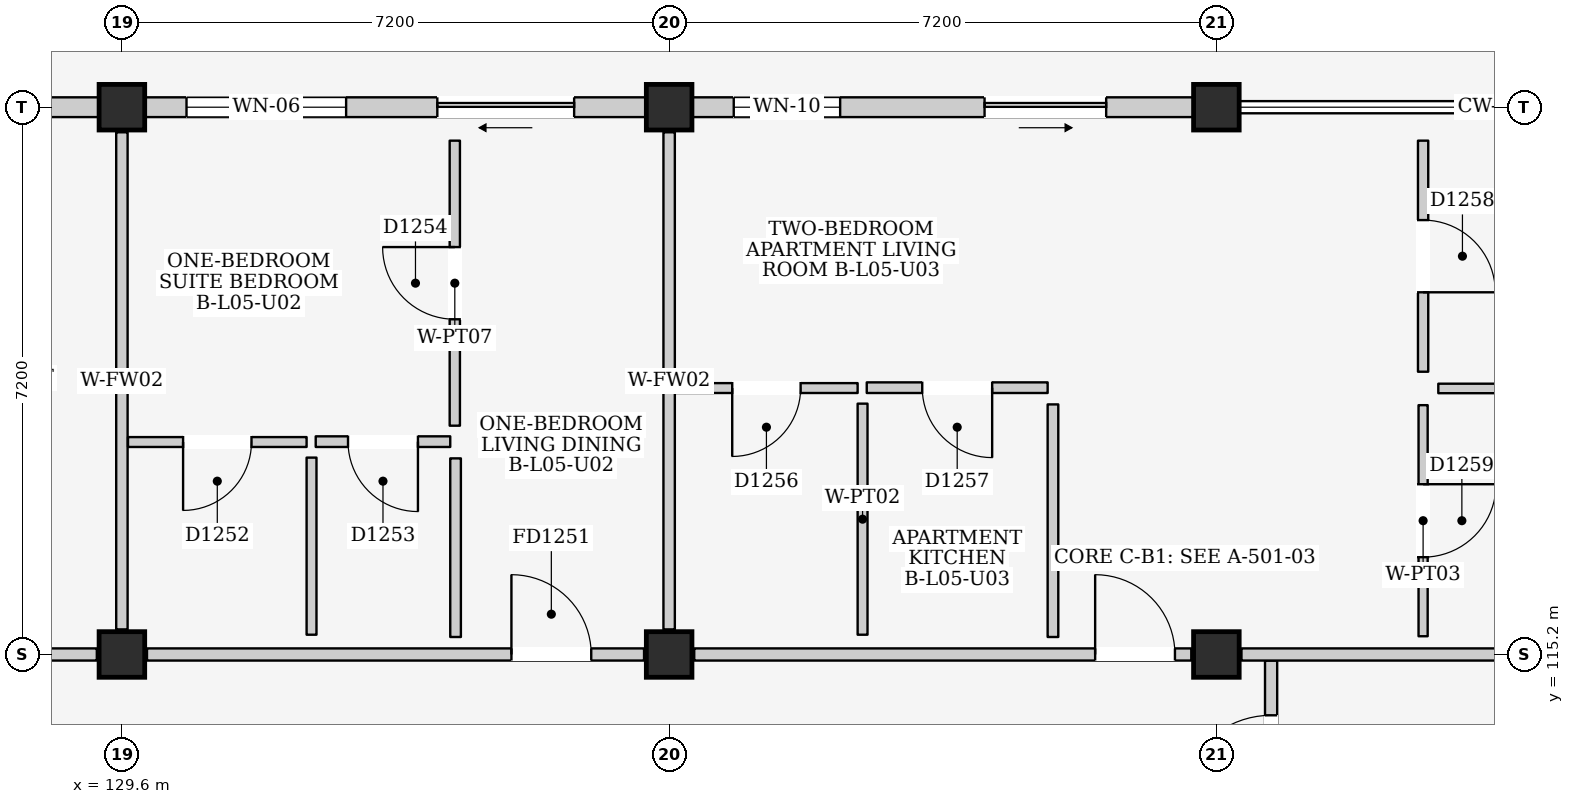
"""IFC4 building model, lengths in metres.
Left out: names, types, materials, properties, quantities, classifications, styles, units other than length and angle.
Written with IfcOpenShell. Run it as: python <this file> out.ifc"""

import sys

from ifc_helpers import new_model, si_unit, direction, frame, frame_2d, origin, origin_2d, place, context, subcontext, project, spatial, rectangle, extrude, element, fill, save


model = new_model("IFC4")
c1 = context("Model", 3, precision=1e-05, world=origin(), true_north=direction((0.0, 1.0)))
c2 = subcontext(c1, "Body", "Model", "MODEL_VIEW")
j1 = project(units=[si_unit("LENGTHUNIT", "METRE"), si_unit("PLANEANGLEUNIT", "RADIAN")], contexts=[c1])
p1 = place(None, origin())
s1 = spatial("IfcSite", under=j1, at=p1, CompositionType="ELEMENT")
p2 = place(p1, origin())
s2 = spatial("IfcBuilding", under=s1, at=p2, CompositionType="ELEMENT")
p3 = place(p2, frame((0.0, 0.0, 18.6)))
s3 = spatial("IfcBuildingStorey", under=s2, at=p3, CompositionType="ELEMENT", Elevation=18.6)
for number, where, z_axis, x_axis in (
    (1, (129.6, 115.2, 0.0), (0.0, 0.0, 1.0), (1.0, 0.0, 0.0)),
    (2, (129.6, 122.4, 0.0), (0.0, 0.0, 1.0), (1.0, 0.0, 0.0)),
    (3, (136.8, 115.2, 0.0), (0.0, 0.0, 1.0), (1.0, 0.0, 0.0)),
    (4, (136.8, 122.4, 0.0), (0.0, 0.0, 1.0), (1.0, 0.0, 0.0)),
    (5, (144.0, 115.2, 0.0), (0.0, 0.0, 1.0), (1.0, 0.0, 0.0)),
    (6, (144.0, 122.4, 0.0), (0.0, 0.0, 1.0), (1.0, 0.0, 0.0)),
):
    element("IfcColumn", number, at=place(p3, frame(where, z_axis=z_axis, x_axis=x_axis)), inside=s3, PredefinedType="COLUMN", context=c2, shape_type="SweptSolid", body=[
        extrude(rectangle(XDim=0.6, YDim=0.6, at=origin_2d()), origin(), (0.0, 0.0, 1.0), 3.3),
    ])
p4 = place(p3, frame((122.7, 122.4, 0.0), z_axis=(0.0, 0.0, 1.0), x_axis=(1.0, 0.0, 0.0)))
e7 = element("IfcWall", 7, at=p4, inside=s3, PredefinedType="ELEMENTEDWALL", context=c2, shape_type="SweptSolid", body=[
    extrude(rectangle(XDim=6.6, YDim=0.26, at=frame_2d((3.3, 0.0))), origin(), (0.0, 0.0, 1.0), 2.595),
])
p5 = place(p4, frame((3.85, 0.0, 0.0)))
e8 = element("IfcOpeningElement", 8, at=p5, cuts=e7, PredefinedType="OPENING", context=c2, shape_type="SweptSolid", body=[
    extrude(rectangle(XDim=1.4, YDim=2.1, at=frame_2d((0.7, 1.05))), frame((0.0, 0.145, 0.0), z_axis=(0.0, -1.0, 0.0), x_axis=(1.0, 0.0, 0.0)), (0.0, 0.0, 1.0), 0.29),
])
p6 = place(p4, frame((0.55, 0.0, 0.835)))
e9 = element("IfcOpeningElement", 9, at=p6, cuts=e7, PredefinedType="OPENING", context=c2, shape_type="SweptSolid", body=[
    extrude(rectangle(XDim=2.4, YDim=1.65, at=frame_2d((1.2, 0.825))), frame((0.0, 0.145, 0.0), z_axis=(0.0, -1.0, 0.0), x_axis=(1.0, 0.0, 0.0)), (0.0, 0.0, 1.0), 0.29),
])
p7 = place(p3, frame((129.9, 122.4, 0.0), z_axis=(0.0, 0.0, 1.0), x_axis=(1.0, 0.0, 0.0)))
e10 = element("IfcWall", 10, at=p7, inside=s3, PredefinedType="ELEMENTEDWALL", context=c2, shape_type="SweptSolid", body=[
    extrude(rectangle(XDim=6.6, YDim=0.26, at=frame_2d((3.3, 0.0))), origin(), (0.0, 0.0, 1.0), 2.595),
])
p8 = place(p7, frame((3.85, 0.0, 0.0)))
e11 = element("IfcOpeningElement", 11, at=p8, cuts=e10, PredefinedType="OPENING", context=c2, shape_type="SweptSolid", body=[
    extrude(rectangle(XDim=1.8, YDim=2.12, at=frame_2d((0.9, 1.06))), frame((0.0, 0.145, 0.0), z_axis=(0.0, -1.0, 0.0), x_axis=(1.0, 0.0, 0.0)), (0.0, 0.0, 1.0), 0.29),
])
p9 = place(p7, frame((0.55, 0.0, 0.835)))
e12 = element("IfcOpeningElement", 12, at=p9, cuts=e10, PredefinedType="OPENING", context=c2, shape_type="SweptSolid", body=[
    extrude(rectangle(XDim=2.1, YDim=1.65, at=frame_2d((1.05, 0.825))), frame((0.0, 0.145, 0.0), z_axis=(0.0, -1.0, 0.0), x_axis=(1.0, 0.0, 0.0)), (0.0, 0.0, 1.0), 0.29),
])
p10 = place(p3, frame((137.1, 122.4, 0.0), z_axis=(0.0, 0.0, 1.0), x_axis=(1.0, 0.0, 0.0)))
e13 = element("IfcWall", 13, at=p10, inside=s3, PredefinedType="ELEMENTEDWALL", context=c2, shape_type="SweptSolid", body=[
    extrude(rectangle(XDim=6.6, YDim=0.26, at=frame_2d((3.3, 0.0))), origin(), (0.0, 0.0, 1.0), 2.595),
])
p11 = place(p10, frame((3.85, 0.0, 0.0)))
e14 = element("IfcOpeningElement", 14, at=p11, cuts=e13, PredefinedType="OPENING", context=c2, shape_type="SweptSolid", body=[
    extrude(rectangle(XDim=1.6, YDim=2.12, at=frame_2d((0.8, 1.06))), frame((0.0, 0.145, 0.0), z_axis=(0.0, -1.0, 0.0), x_axis=(1.0, 0.0, 0.0)), (0.0, 0.0, 1.0), 0.29),
])
p12 = place(p10, frame((0.55, 0.0, 0.9)))
e15 = element("IfcOpeningElement", 15, at=p12, cuts=e13, PredefinedType="OPENING", context=c2, shape_type="SweptSolid", body=[
    extrude(rectangle(XDim=1.4, YDim=1.2, at=frame_2d((0.7, 0.6))), frame((0.0, 0.145, 0.0), z_axis=(0.0, -1.0, 0.0), x_axis=(1.0, 0.0, 0.0)), (0.0, 0.0, 1.0), 0.29),
])
p13 = place(p3, frame((144.72, 111.1, 0.0), z_axis=(0.0, 0.0, 1.0), x_axis=(0.0, 1.0, 0.0)))
e16 = element("IfcWall", 16, at=p13, inside=s3, PredefinedType="PARTITIONING", context=c2, shape_type="SweptSolid", body=[
    extrude(rectangle(XDim=4.02, YDim=0.16, at=frame_2d((2.01, 0.0))), origin(), (0.0, 0.0, 1.0), 3.06),
])
p14 = place(p13, frame((2.1, 0.0, 0.0)))
e17 = element("IfcOpeningElement", 17, at=p14, cuts=e16, PredefinedType="OPENING", context=c2, shape_type="SweptSolid", body=[
    extrude(rectangle(XDim=1.2, YDim=2.2, at=frame_2d((0.6, 1.1))), frame((0.0, 0.095, 0.0), z_axis=(0.0, -1.0, 0.0), x_axis=(1.0, 0.0, 0.0)), (0.0, 0.0, 1.0), 0.19),
])
p15 = place(p3, frame((122.73, 115.2, 0.0), z_axis=(0.0, 0.0, 1.0), x_axis=(1.0, 0.0, 0.0)))
e18 = element("IfcWall", 18, at=p15, inside=s3, PredefinedType="PARTITIONING", context=c2, shape_type="SweptSolid", body=[
    extrude(rectangle(XDim=6.54, YDim=0.16, at=frame_2d((3.27, 0.0))), origin(), (0.0, 0.0, 1.0), 2.445),
])
p16 = place(p15, frame((4.095, 0.0, 0.0)))
e19 = element("IfcOpeningElement", 19, at=p16, cuts=e18, PredefinedType="OPENING", context=c2, shape_type="SweptSolid", body=[
    extrude(rectangle(XDim=1.05, YDim=2.15, at=frame_2d((0.525, 1.075))), frame((0.0, 0.095, 0.0), z_axis=(0.0, -1.0, 0.0), x_axis=(1.0, 0.0, 0.0)), (0.0, 0.0, 1.0), 0.19),
])
p17 = place(p3, frame((129.6, 115.53, 0.0), z_axis=(0.0, 0.0, 1.0), x_axis=(0.0, 1.0, 0.0)))
e20 = element("IfcWall", 20, at=p17, inside=s3, PredefinedType="PARTITIONING", context=c2, shape_type="SweptSolid", body=[
    extrude(rectangle(XDim=6.54, YDim=0.15, at=frame_2d((3.27, 0.0))), origin(), (0.0, 0.0, 1.0), 2.545),
])
p18 = place(p3, frame((129.93, 115.2, 0.0), z_axis=(0.0, 0.0, 1.0), x_axis=(1.0, 0.0, 0.0)))
e21 = element("IfcWall", 21, at=p18, inside=s3, PredefinedType="PARTITIONING", context=c2, shape_type="SweptSolid", body=[
    extrude(rectangle(XDim=6.54, YDim=0.16, at=frame_2d((3.27, 0.0))), origin(), (0.0, 0.0, 1.0), 2.445),
])
p19 = place(p18, frame((4.795, 0.0, 0.0)))
e22 = element("IfcOpeningElement", 22, at=p19, cuts=e21, PredefinedType="OPENING", context=c2, shape_type="SweptSolid", body=[
    extrude(rectangle(XDim=1.05, YDim=2.15, at=frame_2d((0.525, 1.075))), frame((0.0, 0.095, 0.0), z_axis=(0.0, -1.0, 0.0), x_axis=(1.0, 0.0, 0.0)), (0.0, 0.0, 1.0), 0.19),
])
p20 = place(p3, frame((136.8, 115.53, 0.0), z_axis=(0.0, 0.0, 1.0), x_axis=(0.0, 1.0, 0.0)))
e23 = element("IfcWall", 23, at=p20, inside=s3, PredefinedType="PARTITIONING", context=c2, shape_type="SweptSolid", body=[
    extrude(rectangle(XDim=6.54, YDim=0.15, at=frame_2d((3.27, 0.0))), origin(), (0.0, 0.0, 1.0), 2.545),
])
p21 = place(p3, frame((129.68, 117.995, 0.0), z_axis=(0.0, 0.0, 1.0), x_axis=(1.0, 0.0, 0.0)))
e24 = element("IfcWall", 24, at=p21, inside=s3, PredefinedType="PARTITIONING", context=c2, shape_type="SweptSolid", body=[
    extrude(rectangle(XDim=2.35, YDim=0.13, at=frame_2d((1.175, 0.0))), origin(), (0.0, 0.0, 1.0), 3.06),
])
p22 = place(p21, frame((0.725, 0.0, 0.0)))
e25 = element("IfcOpeningElement", 25, at=p22, cuts=e24, PredefinedType="OPENING", context=c2, shape_type="SweptSolid", body=[
    extrude(rectangle(XDim=0.9, YDim=2.1, at=frame_2d((0.45, 1.05))), frame((0.0, 0.08, 0.0), z_axis=(0.0, -1.0, 0.0), x_axis=(1.0, 0.0, 0.0)), (0.0, 0.0, 1.0), 0.16),
])
p23 = place(p3, frame((132.095, 115.46, 0.0), z_axis=(0.0, 0.0, 1.0), x_axis=(0.0, 1.0, 0.0)))
e26 = element("IfcWall", 26, at=p23, inside=s3, PredefinedType="PARTITIONING", context=c2, shape_type="SweptSolid", body=[
    extrude(rectangle(XDim=2.33, YDim=0.13, at=frame_2d((1.165, 0.0))), origin(), (0.0, 0.0, 1.0), 3.06),
])
p24 = place(p3, frame((132.15, 118.0, 0.0), z_axis=(0.0, 0.0, 1.0), x_axis=(1.0, 0.0, 0.0)))
e27 = element("IfcWall", 27, at=p24, inside=s3, PredefinedType="PARTITIONING", context=c2, shape_type="SweptSolid", body=[
    extrude(rectangle(XDim=1.77, YDim=0.14, at=frame_2d((0.885, 0.0))), origin(), (0.0, 0.0, 1.0), 3.06),
])
p25 = place(p24, frame((0.425, 0.0, 0.0)))
e28 = element("IfcOpeningElement", 28, at=p25, cuts=e27, PredefinedType="OPENING", context=c2, shape_type="SweptSolid", body=[
    extrude(rectangle(XDim=0.92, YDim=2.1, at=frame_2d((0.46, 1.05))), frame((0.0, 0.085, 0.0), z_axis=(0.0, -1.0, 0.0), x_axis=(1.0, 0.0, 0.0)), (0.0, 0.0, 1.0), 0.17),
])
p26 = place(p3, frame((133.99, 115.43, 0.0), z_axis=(0.0, 0.0, 1.0), x_axis=(0.0, 1.0, 0.0)))
e29 = element("IfcWall", 29, at=p26, inside=s3, PredefinedType="PARTITIONING", context=c2, shape_type="SweptSolid", body=[
    extrude(rectangle(XDim=2.35, YDim=0.14, at=frame_2d((1.175, 0.0))), origin(), (0.0, 0.0, 1.0), 3.06),
])
p27 = place(p3, frame((133.98, 118.21, 0.0), z_axis=(0.0, 0.0, 1.0), x_axis=(0.0, 1.0, 0.0)))
e30 = element("IfcWall", 30, at=p27, inside=s3, PredefinedType="PARTITIONING", context=c2, shape_type="SweptSolid", body=[
    extrude(rectangle(XDim=3.75, YDim=0.135, at=frame_2d((1.875, 0.0))), origin(), (0.0, 0.0, 1.0), 3.06),
])
p28 = place(p27, frame((1.4, 0.0, 0.0)))
e31 = element("IfcOpeningElement", 31, at=p28, cuts=e30, PredefinedType="OPENING", context=c2, shape_type="SweptSolid", body=[
    extrude(rectangle(XDim=0.95, YDim=2.15, at=frame_2d((0.475, 1.075))), frame((0.0, 0.083, 0.0), z_axis=(0.0, -1.0, 0.0), x_axis=(1.0, 0.0, 0.0)), (0.0, 0.0, 1.0), 0.165),
])
p29 = place(p3, frame((137.13, 115.2, 0.0), z_axis=(0.0, 0.0, 1.0), x_axis=(1.0, 0.0, 0.0)))
e32 = element("IfcWall", 32, at=p29, inside=s3, PredefinedType="PARTITIONING", context=c2, shape_type="SweptSolid", body=[
    extrude(rectangle(XDim=6.54, YDim=0.16, at=frame_2d((3.27, 0.0))), origin(), (0.0, 0.0, 1.0), 2.445),
])
p30 = place(p29, frame((5.275, 0.0, 0.0)))
e33 = element("IfcOpeningElement", 33, at=p30, cuts=e32, PredefinedType="OPENING", context=c2, shape_type="SweptSolid", body=[
    extrude(rectangle(XDim=1.05, YDim=2.15, at=frame_2d((0.525, 1.075))), frame((0.0, 0.095, 0.0), z_axis=(0.0, -1.0, 0.0), x_axis=(1.0, 0.0, 0.0)), (0.0, 0.0, 1.0), 0.19),
])
p31 = place(p3, frame((144.33, 115.2, 0.0), z_axis=(0.0, 0.0, 1.0), x_axis=(1.0, 0.0, 0.0)))
e34 = element("IfcWall", 34, at=p31, inside=s3, PredefinedType="PARTITIONING", context=c2, shape_type="SweptSolid", body=[
    extrude(rectangle(XDim=6.54, YDim=0.16, at=frame_2d((3.27, 0.0))), origin(), (0.0, 0.0, 1.0), 2.445),
])
p32 = place(p3, frame((136.88, 118.705, 0.0), z_axis=(0.0, 0.0, 1.0), x_axis=(1.0, 0.0, 0.0)))
e35 = element("IfcWall", 35, at=p32, inside=s3, PredefinedType="PARTITIONING", context=c2, shape_type="SweptSolid", body=[
    extrude(rectangle(XDim=2.4, YDim=0.13, at=frame_2d((1.2, 0.0))), origin(), (0.0, 0.0, 1.0), 3.06),
])
p33 = place(p32, frame((0.75, 0.0, 0.0)))
e36 = element("IfcOpeningElement", 36, at=p33, cuts=e35, PredefinedType="OPENING", context=c2, shape_type="SweptSolid", body=[
    extrude(rectangle(XDim=0.9, YDim=2.1, at=frame_2d((0.45, 1.05))), frame((0.0, 0.08, 0.0), z_axis=(0.0, -1.0, 0.0), x_axis=(1.0, 0.0, 0.0)), (0.0, 0.0, 1.0), 0.16),
])
p34 = place(p3, frame((139.345, 115.46, 0.0), z_axis=(0.0, 0.0, 1.0), x_axis=(0.0, 1.0, 0.0)))
e37 = element("IfcWall", 37, at=p34, inside=s3, PredefinedType="PARTITIONING", context=c2, shape_type="SweptSolid", body=[
    extrude(rectangle(XDim=3.04, YDim=0.13, at=frame_2d((1.52, 0.0))), origin(), (0.0, 0.0, 1.0), 3.06),
])
p35 = place(p3, frame((139.4, 118.71, 0.0), z_axis=(0.0, 0.0, 1.0), x_axis=(1.0, 0.0, 0.0)))
e38 = element("IfcWall", 38, at=p35, inside=s3, PredefinedType="PARTITIONING", context=c2, shape_type="SweptSolid", body=[
    extrude(rectangle(XDim=2.38, YDim=0.14, at=frame_2d((1.19, 0.0))), origin(), (0.0, 0.0, 1.0), 3.06),
])
p36 = place(p35, frame((0.73, 0.0, 0.0)))
e39 = element("IfcOpeningElement", 39, at=p36, cuts=e38, PredefinedType="OPENING", context=c2, shape_type="SweptSolid", body=[
    extrude(rectangle(XDim=0.92, YDim=2.1, at=frame_2d((0.46, 1.05))), frame((0.0, 0.085, 0.0), z_axis=(0.0, -1.0, 0.0), x_axis=(1.0, 0.0, 0.0)), (0.0, 0.0, 1.0), 0.17),
])
p37 = place(p3, frame((141.85, 115.43, 0.0), z_axis=(0.0, 0.0, 1.0), x_axis=(0.0, 1.0, 0.0)))
e40 = element("IfcWall", 40, at=p37, inside=s3, PredefinedType="PARTITIONING", context=c2, shape_type="SweptSolid", body=[
    extrude(rectangle(XDim=3.06, YDim=0.14, at=frame_2d((1.53, 0.0))), origin(), (0.0, 0.0, 1.0), 3.06),
])
p38 = place(p3, frame((146.72, 118.92, 0.0), z_axis=(0.0, 0.0, 1.0), x_axis=(0.0, 1.0, 0.0)))
e41 = element("IfcWall", 41, at=p38, inside=s3, PredefinedType="PARTITIONING", context=c2, shape_type="SweptSolid", body=[
    extrude(rectangle(XDim=3.04, YDim=0.135, at=frame_2d((1.52, 0.0))), origin(), (0.0, 0.0, 1.0), 3.06),
])
p39 = place(p38, frame((1.045, 0.0, 0.0)))
e42 = element("IfcOpeningElement", 42, at=p39, cuts=e41, PredefinedType="OPENING", context=c2, shape_type="SweptSolid", body=[
    extrude(rectangle(XDim=0.95, YDim=2.15, at=frame_2d((0.475, 1.075))), frame((0.0, 0.083, 0.0), z_axis=(0.0, -1.0, 0.0), x_axis=(1.0, 0.0, 0.0)), (0.0, 0.0, 1.0), 0.165),
])
p40 = place(p3, frame((146.92, 118.7, 0.0), z_axis=(0.0, 0.0, 1.0), x_axis=(1.0, 0.0, 0.0)))
e43 = element("IfcWall", 43, at=p40, inside=s3, PredefinedType="PARTITIONING", context=c2, shape_type="SweptSolid", body=[
    extrude(rectangle(XDim=4.06, YDim=0.125, at=frame_2d((2.03, 0.0))), origin(), (0.0, 0.0, 1.0), 3.06),
])
p41 = place(p3, frame((146.72, 115.44, 0.0), z_axis=(0.0, 0.0, 1.0), x_axis=(0.0, 1.0, 0.0)))
e44 = element("IfcWall", 44, at=p41, inside=s3, PredefinedType="PARTITIONING", context=c2, shape_type="SweptSolid", body=[
    extrude(rectangle(XDim=3.04, YDim=0.12, at=frame_2d((1.52, 0.0))), origin(), (0.0, 0.0, 1.0), 3.06),
])
p42 = place(p41, frame((1.04, 0.0, 0.0)))
e45 = element("IfcOpeningElement", 45, at=p42, cuts=e44, PredefinedType="OPENING", context=c2, shape_type="SweptSolid", body=[
    extrude(rectangle(XDim=0.96, YDim=2.15, at=frame_2d((0.48, 1.075))), frame((0.0, 0.075, 0.0), z_axis=(0.0, -1.0, 0.0), x_axis=(1.0, 0.0, 0.0)), (0.0, 0.0, 1.0), 0.15),
])
p43 = place(p8, frame((1.8, 0.0, 0.0), z_axis=(0.0, 0.0, 1.0), x_axis=(-1.0, 0.0, 0.0)))
e46 = element("IfcDoor", 46, at=p43, inside=s3, OperationType="SLIDING_TO_LEFT", PredefinedType="DOOR", context=c2, shape_type="SweptSolid", body=[
    extrude(rectangle(XDim=1.8, YDim=2.12, at=frame_2d((0.9, 1.06))), frame((0.0, 0.025, 0.0), z_axis=(0.0, -1.0, 0.0), x_axis=(1.0, 0.0, 0.0)), (0.0, 0.0, 1.0), 0.05),
])
fill(e11, e46)
p44 = place(p9, origin())
e47 = element("IfcWindow", 47, at=p44, inside=s3, PartitioningType="DOUBLE_PANEL_VERTICAL", PredefinedType="WINDOW", context=c2, shape_type="SweptSolid", body=[
    extrude(rectangle(XDim=2.1, YDim=1.65, at=frame_2d((1.05, 0.825))), frame((0.0, 0.03, 0.0), z_axis=(0.0, -1.0, 0.0), x_axis=(1.0, 0.0, 0.0)), (0.0, 0.0, 1.0), 0.06),
])
fill(e12, e47)
p45 = place(p11, frame((1.6, 0.0, 0.0), z_axis=(0.0, 0.0, 1.0), x_axis=(-1.0, 0.0, 0.0)))
e48 = element("IfcDoor", 48, at=p45, inside=s3, OperationType="SLIDING_TO_RIGHT", PredefinedType="DOOR", context=c2, shape_type="SweptSolid", body=[
    extrude(rectangle(XDim=1.6, YDim=2.12, at=frame_2d((0.8, 1.06))), frame((0.0, 0.025, 0.0), z_axis=(0.0, -1.0, 0.0), x_axis=(1.0, 0.0, 0.0)), (0.0, 0.0, 1.0), 0.05),
])
fill(e14, e48)
p46 = place(p12, origin())
e49 = element("IfcWindow", 49, at=p46, inside=s3, PartitioningType="DOUBLE_PANEL_HORIZONTAL", PredefinedType="WINDOW", context=c2, shape_type="SweptSolid", body=[
    extrude(rectangle(XDim=1.4, YDim=1.2, at=frame_2d((0.7, 0.6))), frame((0.0, 0.03, 0.0), z_axis=(0.0, -1.0, 0.0), x_axis=(1.0, 0.0, 0.0)), (0.0, 0.0, 1.0), 0.06),
])
fill(e15, e49)
p47 = place(p14, origin())
e50 = element("IfcDoor", 50, at=p47, inside=s3, OperationType="SINGLE_SWING_LEFT", PredefinedType="DOOR", context=c2, shape_type="SweptSolid", body=[
    extrude(rectangle(XDim=1.2, YDim=2.2, at=frame_2d((0.6, 1.1))), frame((0.0, 0.025, 0.0), z_axis=(0.0, -1.0, 0.0), x_axis=(1.0, 0.0, 0.0)), (0.0, 0.0, 1.0), 0.05),
])
fill(e17, e50)
p48 = place(p19, origin())
e51 = element("IfcDoor", 51, at=p48, inside=s3, OperationType="SINGLE_SWING_LEFT", PredefinedType="DOOR", context=c2, shape_type="SweptSolid", body=[
    extrude(rectangle(XDim=1.05, YDim=2.15, at=frame_2d((0.525, 1.075))), frame((0.0, 0.025, 0.0), z_axis=(0.0, -1.0, 0.0), x_axis=(1.0, 0.0, 0.0)), (0.0, 0.0, 1.0), 0.05),
])
fill(e22, e51)
p49 = place(p22, frame((0.9, 0.0, 0.0), z_axis=(0.0, 0.0, 1.0), x_axis=(-1.0, 0.0, 0.0)))
e52 = element("IfcDoor", 52, at=p49, inside=s3, OperationType="SINGLE_SWING_RIGHT", PredefinedType="DOOR", context=c2, shape_type="SweptSolid", body=[
    extrude(rectangle(XDim=0.9, YDim=2.1, at=frame_2d((0.45, 1.05))), frame((0.0, 0.025, 0.0), z_axis=(0.0, -1.0, 0.0), x_axis=(1.0, 0.0, 0.0)), (0.0, 0.0, 1.0), 0.05),
])
fill(e25, e52)
p50 = place(p25, frame((0.92, 0.0, 0.0), z_axis=(0.0, 0.0, 1.0), x_axis=(-1.0, 0.0, 0.0)))
e53 = element("IfcDoor", 53, at=p50, inside=s3, OperationType="SINGLE_SWING_LEFT", PredefinedType="DOOR", context=c2, shape_type="SweptSolid", body=[
    extrude(rectangle(XDim=0.92, YDim=2.1, at=frame_2d((0.46, 1.05))), frame((0.0, 0.025, 0.0), z_axis=(0.0, -1.0, 0.0), x_axis=(1.0, 0.0, 0.0)), (0.0, 0.0, 1.0), 0.05),
])
fill(e28, e53)
p51 = place(p28, origin())
e54 = element("IfcDoor", 54, at=p51, inside=s3, OperationType="SINGLE_SWING_RIGHT", PredefinedType="DOOR", context=c2, shape_type="SweptSolid", body=[
    extrude(rectangle(XDim=0.95, YDim=2.15, at=frame_2d((0.475, 1.075))), frame((0.0, 0.025, 0.0), z_axis=(0.0, -1.0, 0.0), x_axis=(1.0, 0.0, 0.0)), (0.0, 0.0, 1.0), 0.05),
])
fill(e31, e54)
p52 = place(p30, origin())
e55 = element("IfcDoor", 55, at=p52, inside=s3, OperationType="SINGLE_SWING_LEFT", PredefinedType="DOOR", context=c2, shape_type="SweptSolid", body=[
    extrude(rectangle(XDim=1.05, YDim=2.15, at=frame_2d((0.525, 1.075))), frame((0.0, 0.025, 0.0), z_axis=(0.0, -1.0, 0.0), x_axis=(1.0, 0.0, 0.0)), (0.0, 0.0, 1.0), 0.05),
])
fill(e33, e55)
p53 = place(p33, frame((0.9, 0.0, 0.0), z_axis=(0.0, 0.0, 1.0), x_axis=(-1.0, 0.0, 0.0)))
e56 = element("IfcDoor", 56, at=p53, inside=s3, OperationType="SINGLE_SWING_RIGHT", PredefinedType="DOOR", context=c2, shape_type="SweptSolid", body=[
    extrude(rectangle(XDim=0.9, YDim=2.1, at=frame_2d((0.45, 1.05))), frame((0.0, 0.025, 0.0), z_axis=(0.0, -1.0, 0.0), x_axis=(1.0, 0.0, 0.0)), (0.0, 0.0, 1.0), 0.05),
])
fill(e36, e56)
p54 = place(p36, frame((0.92, 0.0, 0.0), z_axis=(0.0, 0.0, 1.0), x_axis=(-1.0, 0.0, 0.0)))
e57 = element("IfcDoor", 57, at=p54, inside=s3, OperationType="SINGLE_SWING_LEFT", PredefinedType="DOOR", context=c2, shape_type="SweptSolid", body=[
    extrude(rectangle(XDim=0.92, YDim=2.1, at=frame_2d((0.46, 1.05))), frame((0.0, 0.025, 0.0), z_axis=(0.0, -1.0, 0.0), x_axis=(1.0, 0.0, 0.0)), (0.0, 0.0, 1.0), 0.05),
])
fill(e39, e57)
p55 = place(p39, frame((0.95, 0.0, 0.0), z_axis=(0.0, 0.0, 1.0), x_axis=(-1.0, 0.0, 0.0)))
e58 = element("IfcDoor", 58, at=p55, inside=s3, OperationType="SINGLE_SWING_RIGHT", PredefinedType="DOOR", context=c2, shape_type="SweptSolid", body=[
    extrude(rectangle(XDim=0.95, YDim=2.15, at=frame_2d((0.475, 1.075))), frame((0.0, 0.025, 0.0), z_axis=(0.0, -1.0, 0.0), x_axis=(1.0, 0.0, 0.0)), (0.0, 0.0, 1.0), 0.05),
])
fill(e42, e58)
p56 = place(p42, frame((0.96, 0.0, 0.0), z_axis=(0.0, 0.0, 1.0), x_axis=(-1.0, 0.0, 0.0)))
e59 = element("IfcDoor", 59, at=p56, inside=s3, OperationType="SINGLE_SWING_LEFT", PredefinedType="DOOR", context=c2, shape_type="SweptSolid", body=[
    extrude(rectangle(XDim=0.96, YDim=2.15, at=frame_2d((0.48, 1.075))), frame((0.0, 0.025, 0.0), z_axis=(0.0, -1.0, 0.0), x_axis=(1.0, 0.0, 0.0)), (0.0, 0.0, 1.0), 0.05),
])
fill(e45, e59)
save(model, sys.argv[1])
